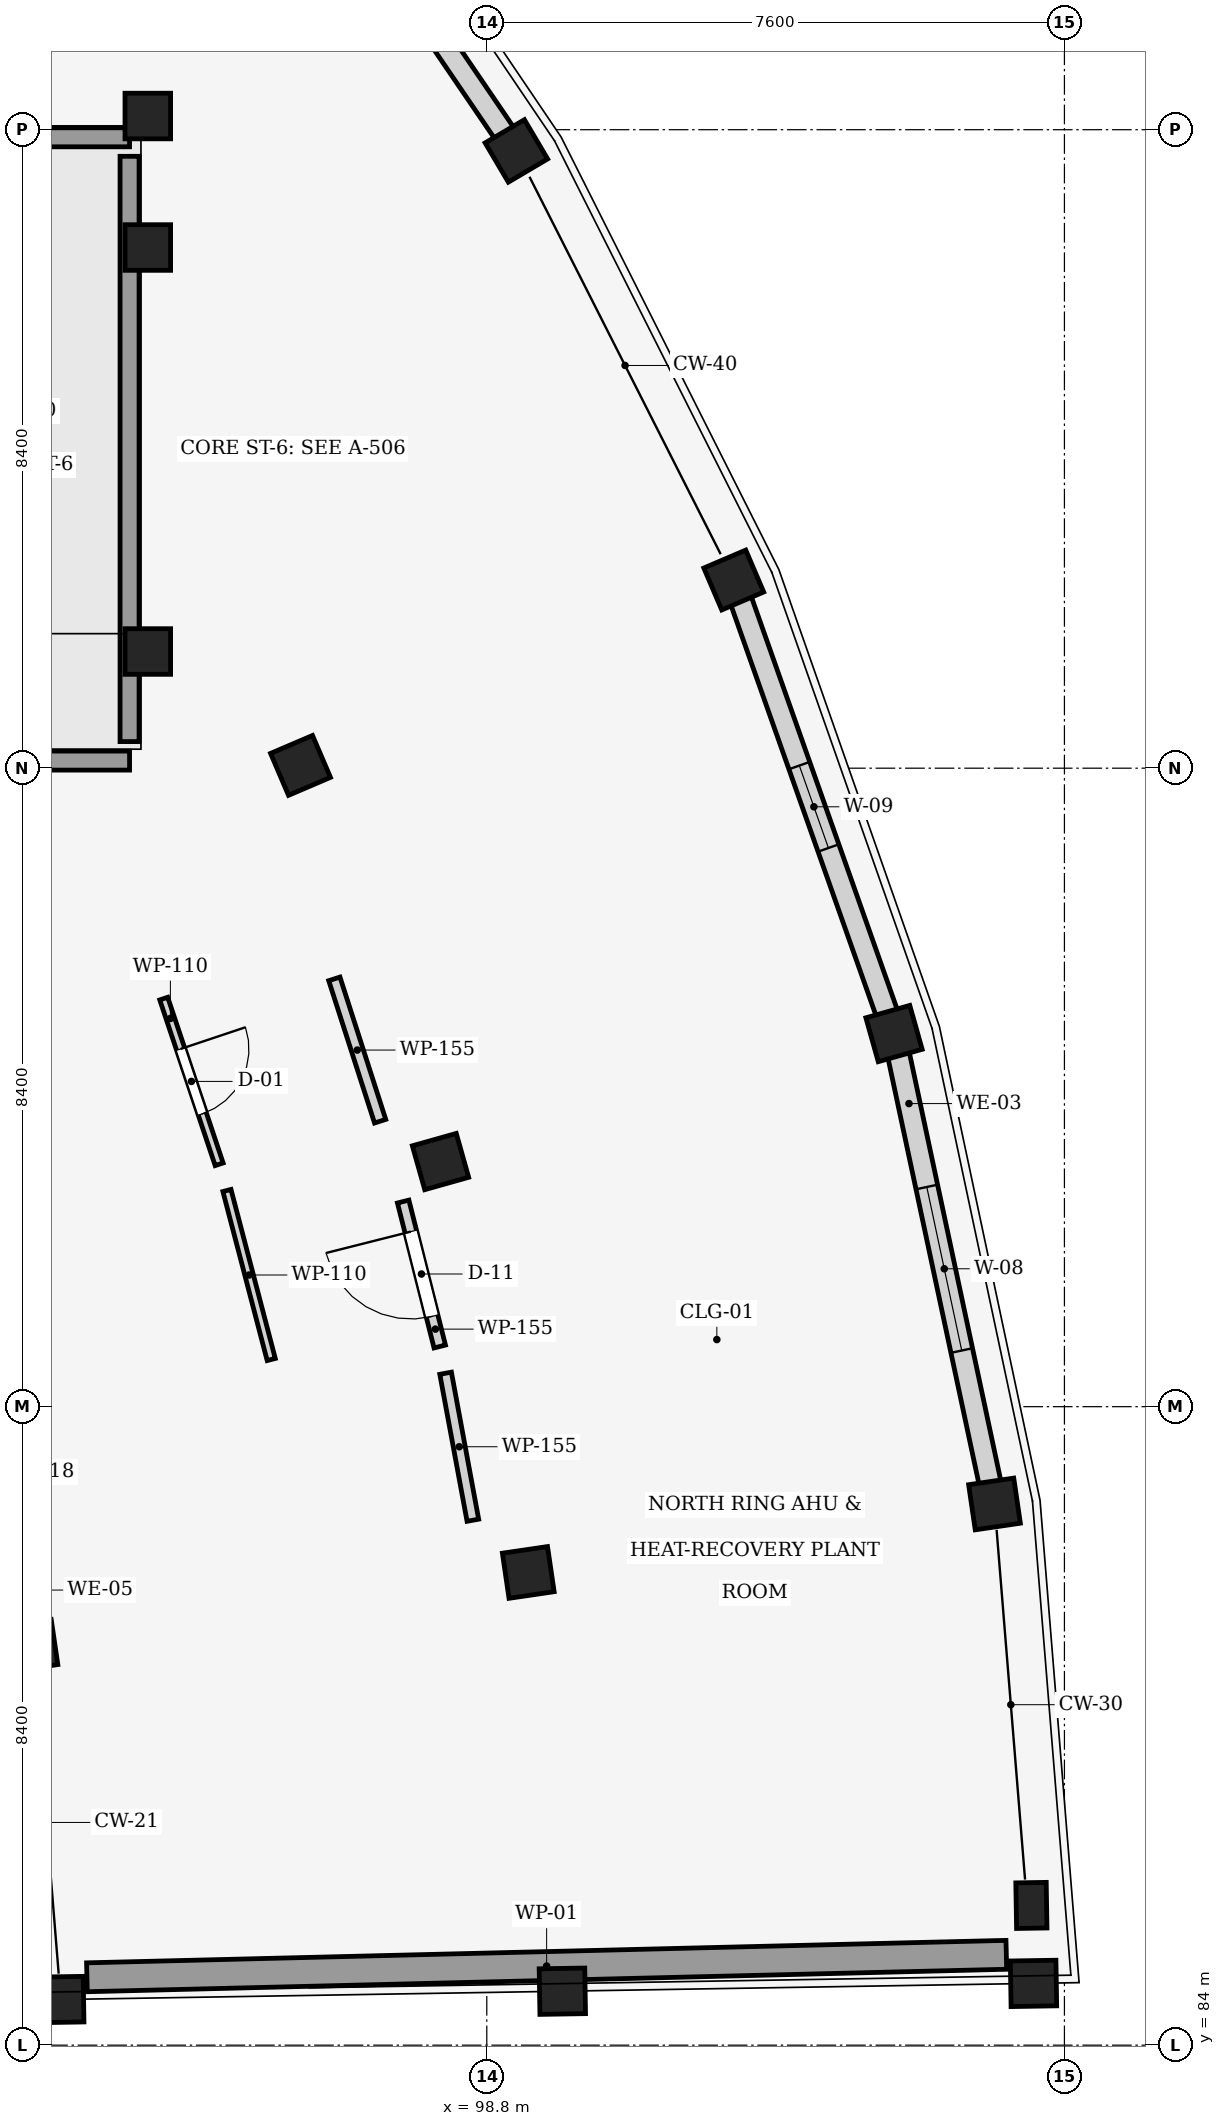
"""IFC4 building model, lengths in metres.
Left out: names, types, materials, properties, quantities, classifications, styles, units other than length and angle.
Written with IfcOpenShell. Run it as: python <this file> out.ifc"""

import sys

from ifc_helpers import new_model, si_unit, direction, frame, frame_2d, origin, origin_2d, place, context, subcontext, project, spatial, rectangle, extrude, element, fill, save


model = new_model("IFC4")
c1 = context("Model", 3, precision=1e-05, world=origin(), true_north=direction((0.0, 1.0)))
c2 = subcontext(c1, "Body", "Model", "MODEL_VIEW")
j1 = project(units=[si_unit("LENGTHUNIT", "METRE"), si_unit("PLANEANGLEUNIT", "RADIAN")], contexts=[c1])
p1 = place(None, origin())
s1 = spatial("IfcSite", under=j1, at=p1, CompositionType="ELEMENT")
p2 = place(p1, origin())
s2 = spatial("IfcBuilding", under=s1, at=p2, CompositionType="ELEMENT")
p3 = place(p2, frame((0.0, 0.0, 25.35)))
s3 = spatial("IfcBuildingStorey", under=s2, at=p3, CompositionType="ELEMENT", Elevation=25.35)
for number, where, z_axis, x_axis in (
    (1, (93.195, 84.6, 0.0), (0.0, 0.0, 1.0), (1.0, 0.017, 0.0)),
    (2, (99.794, 84.71, 0.0), (0.0, 0.0, 1.0), (1.0, 0.017, 0.0)),
    (3, (105.993, 84.812, 0.0), (0.0, 0.0, 1.0), (1.0, 0.017, 0.0)),
):
    element("IfcColumn", number, at=place(p3, frame(where, z_axis=z_axis, x_axis=x_axis)), inside=s3, PredefinedType="COLUMN", context=c2, shape_type="SweptSolid", body=[
        extrude(rectangle(XDim=0.6, YDim=0.6, at=origin_2d()), origin(), (0.0, 0.0, 1.0), 4.05),
    ])
p4 = place(p3, frame((105.966, 85.838, 0.0), z_axis=(0.0, 0.0, 1.0), x_axis=(0.999862544538, 0.016579868188, 0.0)))
e4 = element("IfcColumn", 4, at=p4, inside=s3, PredefinedType="PILASTER", context=c2, shape_type="SweptSolid", body=[
    extrude(rectangle(XDim=0.4, YDim=0.6, at=origin_2d()), origin(), (0.0, 0.0, 1.0), 4.05),
])
for number, where, z_axis, x_axis in (
    (5, (92.816, 89.26, 0.0), (0.0, 0.0, 1.0), (0.989, 0.145, 0.0)),
    (6, (99.346, 90.219, 0.0), (0.0, 0.0, 1.0), (0.989, 0.145, 0.0)),
    (7, (105.48, 91.12, 0.0), (0.0, 0.0, 1.0), (0.989, 0.145, 0.0)),
    (8, (98.191, 95.625, 0.0), (0.0, 0.0, 1.0), (0.962, 0.272, 0.0)),
    (9, (104.158, 97.309, 0.0), (0.0, 0.0, 1.0), (0.962, 0.272, 0.0)),
    (10, (96.349, 100.837, 0.0), (0.0, 0.0, 1.0), (0.919, 0.393, 0.0)),
    (11, (102.049, 103.276, 0.0), (0.0, 0.0, 1.0), (0.919, 0.393, 0.0)),
    (12, (99.189, 108.921, 0.0), (0.0, 0.0, 1.0), (0.861, 0.509, 0.0)),
):
    element("IfcColumn", number, at=place(p3, frame(where, z_axis=z_axis, x_axis=x_axis)), inside=s3, PredefinedType="COLUMN", context=c2, shape_type="SweptSolid", body=[
        extrude(rectangle(XDim=0.6, YDim=0.6, at=origin_2d()), origin(), (0.0, 0.0, 1.0), 4.05),
    ])
for number, where, z_axis, x_axis in (
    (13, (94.34, 102.335, 0.0), (0.0, 0.0, 1.0), (1.0, 0.0, 0.0)),
    (14, (94.34, 107.65, 0.0), (0.0, 0.0, 1.0), (1.0, 0.0, 0.0)),
    (15, (94.34, 109.38, 0.0), (0.0, 0.0, 1.0), (1.0, 0.0, 0.0)),
):
    element("IfcColumn", number, at=place(p3, frame(where, z_axis=z_axis, x_axis=x_axis)), inside=s3, PredefinedType="COLUMN", context=c2, shape_type="SweptSolid", body=[
        extrude(rectangle(XDim=0.6, YDim=0.6, at=origin_2d()), origin(), (0.0, 0.0, 1.0), 3.1),
    ])
p5 = place(p3, frame((104.208, 97.074, 0.0), z_axis=(0.0, 0.0, 1.0), x_axis=(0.208873267346, -0.977942717233, 0.0)))
e16 = element("IfcWall", 16, at=p5, inside=s3, PredefinedType="STANDARD", context=c2, shape_type="SweptSolid", body=[
    extrude(rectangle(XDim=5.848, YDim=0.29, at=frame_2d((2.924, 0.0))), origin(), (0.0, 0.0, 1.0), 2.45),
])
p6 = place(p5, frame((1.824, 0.0, 0.85)))
e17 = element("IfcOpeningElement", 17, at=p6, cuts=e16, PredefinedType="OPENING", context=c2, shape_type="SweptSolid", body=[
    extrude(rectangle(XDim=2.2, YDim=1.35, at=frame_2d((1.1, 0.675))), frame((0.0, 0.155, 0.0), z_axis=(0.0, -1.0, 0.0), x_axis=(1.0, 0.0, 0.0)), (0.0, 0.0, 1.0), 0.31),
])
p7 = place(p3, frame((102.132, 103.041, 0.0), z_axis=(0.0, 0.0, 1.0), x_axis=(0.333212182882, -0.942851865978, 0.0)))
e18 = element("IfcWall", 18, at=p7, inside=s3, PredefinedType="STANDARD", context=c2, shape_type="SweptSolid", body=[
    extrude(rectangle(XDim=5.83, YDim=0.29, at=frame_2d((2.915, 0.0))), origin(), (0.0, 0.0, 1.0), 3.035),
])
p8 = place(p7, frame((2.34, 0.0, 0.85)))
e19 = element("IfcOpeningElement", 19, at=p8, cuts=e18, PredefinedType="OPENING", context=c2, shape_type="SweptSolid", body=[
    extrude(rectangle(XDim=1.15, YDim=1.5, at=frame_2d((0.575, 0.75))), frame((0.0, 0.155, 0.0), z_axis=(0.0, -1.0, 0.0), x_axis=(1.0, 0.0, 0.0)), (0.0, 0.0, 1.0), 0.31),
])
p9 = place(p3, frame((95.786, 113.916, 0.0), z_axis=(0.0, 0.0, 1.0), x_axis=(0.563132935525, -0.826366321269, 0.0)))
e20 = element("IfcWall", 20, at=p9, inside=s3, PredefinedType="STANDARD", context=c2, shape_type="SweptSolid", body=[
    extrude(rectangle(XDim=5.76, YDim=0.29, at=frame_2d((2.88, 0.0))), origin(), (0.0, 0.0, 1.0), 3.035),
])
p10 = place(p9, frame((2.155, 0.0, 0.85)))
e21 = element("IfcOpeningElement", 21, at=p10, cuts=e20, PredefinedType="OPENING", context=c2, shape_type="SweptSolid", body=[
    extrude(rectangle(XDim=1.45, YDim=1.5, at=frame_2d((0.725, 0.75))), frame((0.0, 0.155, 0.0), z_axis=(0.0, -1.0, 0.0), x_axis=(1.0, 0.0, 0.0)), (0.0, 0.0, 1.0), 0.31),
])
p11 = place(p3, frame((105.635, 85.189, 0.0), z_axis=(0.0, 0.0, 1.0), x_axis=(-0.999701441778, -0.024434142249, 0.0)))
e22 = element("IfcWall", 22, at=p11, inside=s3, PredefinedType="SHEAR", context=c2, shape_type="SweptSolid", body=[
    extrude(rectangle(XDim=12.1, YDim=0.38, at=frame_2d((6.05, 0.0))), origin(), (0.0, 0.0, 1.0), 3.75),
])
p12 = place(p3, frame((94.1, 100.9, 0.0), z_axis=(0.0, 0.0, 1.0), x_axis=(-1.0, 0.0, 0.0)))
e23 = element("IfcWall", 23, at=p12, inside=s3, PredefinedType="SHEAR", context=c2, shape_type="SweptSolid", body=[
    extrude(rectangle(XDim=3.64, YDim=0.25, at=frame_2d((1.82, 0.0))), origin(), (0.0, 0.0, 1.0), 3.1),
])
p13 = place(p12, frame((1.145, 0.0, 0.0)))
e24 = element("IfcOpeningElement", 24, at=p13, cuts=e23, PredefinedType="OPENING", context=c2, shape_type="SweptSolid", body=[
    extrude(rectangle(XDim=1.35, YDim=2.2, at=frame_2d((0.675, 1.1))), frame((0.0, 0.135, 0.0), z_axis=(0.0, -1.0, 0.0), x_axis=(1.0, 0.0, 0.0)), (0.0, 0.0, 1.0), 0.27),
])
p14 = place(p3, frame((90.46, 109.1, 0.0), z_axis=(0.0, 0.0, 1.0), x_axis=(1.0, 0.0, 0.0)))
e25 = element("IfcWall", 25, at=p14, inside=s3, PredefinedType="SHEAR", context=c2, shape_type="SweptSolid", body=[
    extrude(rectangle(XDim=3.64, YDim=0.25, at=frame_2d((1.82, 0.0))), origin(), (0.0, 0.0, 1.0), 3.1),
])
p15 = place(p3, frame((94.1, 108.85, 0.0), z_axis=(0.0, 0.0, 1.0), x_axis=(0.0, -1.0, 0.0)))
e26 = element("IfcWall", 26, at=p15, inside=s3, PredefinedType="SHEAR", context=c2, shape_type="SweptSolid", body=[
    extrude(rectangle(XDim=7.7, YDim=0.25, at=frame_2d((3.85, 0.0))), origin(), (0.0, 0.0, 1.0), 3.1),
])
p16 = place(p3, frame((98.181, 93.191, 0.0), z_axis=(0.0, 0.0, 1.0), x_axis=(-0.244871130076, 0.969555635152, 0.0)))
e27 = element("IfcWall", 27, at=p16, inside=s3, PredefinedType="PARTITIONING", context=c2, shape_type="SweptSolid", body=[
    extrude(rectangle(XDim=1.967, YDim=0.155, at=frame_2d((0.983, 0.0))), origin(), (0.0, 0.0, 1.0), 3.035),
])
p17 = place(p16, frame((0.409, 0.0, 0.0)))
e28 = element("IfcOpeningElement", 28, at=p17, cuts=e27, PredefinedType="OPENING", context=c2, shape_type="SweptSolid", body=[
    extrude(rectangle(XDim=1.15, YDim=2.22, at=frame_2d((0.575, 1.11))), frame((0.0, 0.087, 0.0), z_axis=(0.0, -1.0, 0.0), x_axis=(1.0, 0.0, 0.0)), (0.0, 0.0, 1.0), 0.175),
])
for number, where, z_axis, x_axis in (
    (29, (97.397, 96.156, 0.0), (0.0, 0.0, 1.0), (-0.306, 0.952, 0.0)),
    (30, (98.617, 90.906, 0.0), (0.0, 0.0, 1.0), (-0.182, 0.983, 0.0)),
):
    element("IfcWall", number, at=place(p3, frame(where, z_axis=z_axis, x_axis=x_axis)), inside=s3, PredefinedType="PARTITIONING", context=c2, shape_type="SweptSolid", body=[
        extrude(rectangle(XDim=1.967, YDim=0.155, at=frame_2d((0.983, 0.0))), origin(), (0.0, 0.0, 1.0), 3.72),
    ])
p18 = place(p3, frame((94.55, 97.769, 0.0), z_axis=(0.0, 0.0, 1.0), x_axis=(0.317151668087, -0.94837483066, 0.0)))
e31 = element("IfcWall", 31, at=p18, inside=s3, PredefinedType="PARTITIONING", context=c2, shape_type="SweptSolid", body=[
    extrude(rectangle(XDim=2.299, YDim=0.11, at=frame_2d((1.149, 0.0))), origin(), (0.0, 0.0, 1.0), 3.72),
])
p19 = place(p18, frame((0.699, 0.0, 0.0)))
e32 = element("IfcOpeningElement", 32, at=p19, cuts=e31, PredefinedType="OPENING", context=c2, shape_type="SweptSolid", body=[
    extrude(rectangle(XDim=0.9, YDim=2.1, at=frame_2d((0.45, 1.05))), frame((0.0, 0.065, 0.0), z_axis=(0.0, -1.0, 0.0), x_axis=(1.0, 0.0, 0.0)), (0.0, 0.0, 1.0), 0.13),
])
p20 = place(p3, frame((95.381, 95.244, 0.0), z_axis=(0.0, 0.0, 1.0), x_axis=(0.253416186792, -0.96735734673, 0.0)))
e33 = element("IfcWall", 33, at=p20, inside=s3, PredefinedType="PARTITIONING", context=c2, shape_type="SweptSolid", body=[
    extrude(rectangle(XDim=2.299, YDim=0.11, at=frame_2d((1.149, 0.0))), origin(), (0.0, 0.0, 1.0), 3.035),
])
p21 = place(p6, origin())
e34 = element("IfcWindow", 34, at=p21, inside=s3, PartitioningType="SINGLE_PANEL", PredefinedType="WINDOW", context=c2, shape_type="SweptSolid", body=[
    extrude(rectangle(XDim=2.2, YDim=1.35, at=frame_2d((1.1, 0.675))), frame((0.0, 0.03, 0.0), z_axis=(0.0, -1.0, 0.0), x_axis=(1.0, 0.0, 0.0)), (0.0, 0.0, 1.0), 0.06),
])
fill(e17, e34)
p22 = place(p8, origin())
e35 = element("IfcWindow", 35, at=p22, inside=s3, PartitioningType="SINGLE_PANEL", PredefinedType="WINDOW", context=c2, shape_type="SweptSolid", body=[
    extrude(rectangle(XDim=1.15, YDim=1.5, at=frame_2d((0.575, 0.75))), frame((0.0, 0.03, 0.0), z_axis=(0.0, -1.0, 0.0), x_axis=(1.0, 0.0, 0.0)), (0.0, 0.0, 1.0), 0.06),
])
fill(e19, e35)
p23 = place(p17, origin())
e36 = element("IfcDoor", 36, at=p23, inside=s3, OperationType="SINGLE_SWING_RIGHT", PredefinedType="DOOR", context=c2, shape_type="SweptSolid", body=[
    extrude(rectangle(XDim=1.15, YDim=2.22, at=frame_2d((0.575, 1.11))), frame((0.0, 0.025, 0.0), z_axis=(0.0, -1.0, 0.0), x_axis=(1.0, 0.0, 0.0)), (0.0, 0.0, 1.0), 0.05),
])
fill(e28, e36)
p24 = place(p19, origin())
e37 = element("IfcDoor", 37, at=p24, inside=s3, OperationType="SINGLE_SWING_LEFT", PredefinedType="DOOR", context=c2, shape_type="SweptSolid", body=[
    extrude(rectangle(XDim=0.9, YDim=2.1, at=frame_2d((0.45, 1.05))), frame((0.0, 0.025, 0.0), z_axis=(0.0, -1.0, 0.0), x_axis=(1.0, 0.0, 0.0)), (0.0, 0.0, 1.0), 0.05),
])
fill(e32, e37)
save(model, sys.argv[1])
